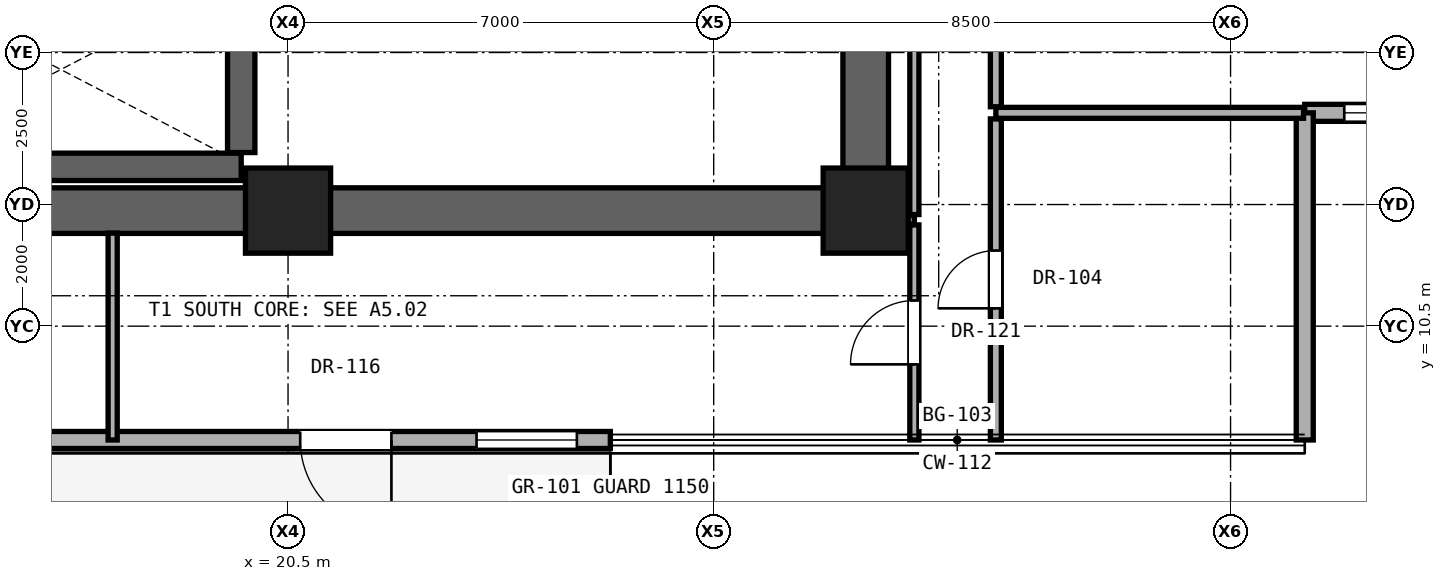
"""IFC4 building model, lengths in metres.
Left out: names, types, materials, properties, quantities, classifications, styles, units other than length and angle.
Written with IfcOpenShell. Run it as: python <this file> out.ifc"""

import sys

from ifc_helpers import new_model, si_unit, direction, frame, frame_2d, origin, origin_2d, place, context, subcontext, project, spatial, rectangle, extrude, element, fill, save


model = new_model("IFC4")
c1 = context("Model", 3, precision=1e-05, world=origin(), true_north=direction((0.0, 1.0)))
c2 = subcontext(c1, "Body", "Model", "MODEL_VIEW")
j1 = project(units=[si_unit("LENGTHUNIT", "METRE"), si_unit("PLANEANGLEUNIT", "RADIAN")], contexts=[c1])
p1 = place(None, origin())
s1 = spatial("IfcSite", under=j1, at=p1, CompositionType="ELEMENT")
p2 = place(p1, origin())
s2 = spatial("IfcBuilding", under=s1, at=p2, CompositionType="ELEMENT")
p3 = place(p2, frame((0.0, 0.0, 35.6)))
s3 = spatial("IfcBuildingStorey", under=s2, at=p3, CompositionType="ELEMENT", Elevation=35.6)
for number, where, z_axis, x_axis in (
    (1, (20.5, 12.4, 0.0), (0.0, 0.0, 1.0), (1.0, 0.0, 0.0)),
    (2, (30.0, 12.4, 0.0), (0.0, 0.0, 1.0), (1.0, 0.0, 0.0)),
):
    element("IfcColumn", number, at=place(p3, frame(where, z_axis=z_axis, x_axis=x_axis)), inside=s3, PredefinedType="COLUMN", context=c2, shape_type="SweptSolid", body=[
        extrude(rectangle(XDim=1.4, YDim=1.4, at=origin_2d()), origin(), (0.0, 0.0, 1.0), 3.3),
    ])
p4 = place(p3, frame((11.0, 12.4, 0.0), z_axis=(0.0, 0.0, 1.0), x_axis=(1.0, 0.0, 0.0)))
e3 = element("IfcWall", 3, at=p4, inside=s3, PredefinedType="SHEAR", context=c2, shape_type="SweptSolid", body=[
    extrude(rectangle(XDim=19.0, YDim=0.75, at=frame_2d((9.5, 0.0))), origin(), (0.0, 0.0, 1.0), 3.06),
])
p5 = place(p3, frame((30.0, 12.4, 0.0), z_axis=(0.0, 0.0, 1.0), x_axis=(0.0, 1.0, 0.0)))
e4 = element("IfcWall", 4, at=p5, inside=s3, PredefinedType="SHEAR", context=c2, shape_type="SweptSolid", body=[
    extrude(rectangle(XDim=6.0, YDim=0.75, at=frame_2d((3.0, 0.0))), origin(), (0.0, 0.0, 1.0), 3.06),
])
p6 = place(p3, frame((25.8, 8.628, 0.0), z_axis=(0.0, 0.0, 1.0), x_axis=(-1.0, 0.0, 0.0)))
e5 = element("IfcWall", 5, at=p6, inside=s3, PredefinedType="SOLIDWALL", context=c2, shape_type="SweptSolid", body=[
    extrude(rectangle(XDim=10.6, YDim=0.28, at=frame_2d((5.3, 0.0))), origin(), (0.0, 0.0, 1.0), 3.02),
])
p7 = place(p6, frame((0.55, 0.0, 0.67)))
e6 = element("IfcOpeningElement", 6, at=p7, cuts=e5, PredefinedType="OPENING", context=c2, shape_type="SweptSolid", body=[
    extrude(rectangle(XDim=1.65, YDim=2.2, at=frame_2d((0.825, 1.1))), frame((0.0, 0.15, 0.0), z_axis=(0.0, -1.0, 0.0), x_axis=(1.0, 0.0, 0.0)), (0.0, 0.0, 1.0), 0.3),
])
p8 = place(p6, frame((3.6, 0.0, 0.0)))
e7 = element("IfcOpeningElement", 7, at=p8, cuts=e5, PredefinedType="OPENING", context=c2, shape_type="SweptSolid", body=[
    extrude(rectangle(XDim=1.5, YDim=2.3, at=frame_2d((0.75, 1.15))), frame((0.0, 0.15, 0.0), z_axis=(0.0, -1.0, 0.0), x_axis=(1.0, 0.0, 0.0)), (0.0, 0.0, 1.0), 0.3),
])
p9 = place(p3, frame((37.22, 14.008, 0.0), z_axis=(0.0, 0.0, 1.0), x_axis=(1.0, 0.0, 0.0)))
e8 = element("IfcWall", 8, at=p9, inside=s3, PredefinedType="SOLIDWALL", context=c2, shape_type="SweptSolid", body=[
    extrude(rectangle(XDim=5.38, YDim=0.28, at=frame_2d((2.69, 0.0))), origin(), (0.0, 0.0, 1.0), 3.04),
])
p10 = place(p9, frame((0.65, 0.0, 0.85)))
e9 = element("IfcOpeningElement", 9, at=p10, cuts=e8, PredefinedType="OPENING", context=c2, shape_type="SweptSolid", body=[
    extrude(rectangle(XDim=1.1, YDim=2.0, at=frame_2d((0.55, 1.0))), frame((0.0, 0.15, 0.0), z_axis=(0.0, -1.0, 0.0), x_axis=(1.0, 0.0, 0.0)), (0.0, 0.0, 1.0), 0.3),
])
p11 = place(p3, frame((37.22, 8.628, 0.0), z_axis=(0.0, 0.0, 1.0), x_axis=(0.0, 1.0, 0.0)))
e10 = element("IfcWall", 10, at=p11, inside=s3, PredefinedType="SOLIDWALL", context=c2, shape_type="SweptSolid", body=[
    extrude(rectangle(XDim=5.38, YDim=0.28, at=frame_2d((2.69, 0.0))), origin(), (0.0, 0.0, 1.0), 3.04),
])
p12 = place(p3, frame((30.37, 12.25, 0.0), z_axis=(0.0, 0.0, 1.0), x_axis=(1.0, 0.0, 0.0)))
e11 = element("IfcWall", 11, at=p12, inside=s3, PredefinedType="PARTITIONING", context=c2, shape_type="SweptSolid", body=[
    extrude(rectangle(XDim=0.43, YDim=0.15, at=frame_2d((0.215, 0.0))), origin(), (0.0, 0.0, 1.0), 3.06),
])
p13 = place(p3, frame((11.37, 13.12, 0.0), z_axis=(0.0, 0.0, 1.0), x_axis=(1.0, 0.0, 0.0)))
e12 = element("IfcWall", 12, at=p13, inside=s3, PredefinedType="SHEAR", context=c2, shape_type="SweptSolid", body=[
    extrude(rectangle(XDim=8.36, YDim=0.45, at=frame_2d((4.18, 0.0))), origin(), (0.0, 0.0, 1.0), 3.06),
])
p14 = place(p3, frame((32.14, 14.008, 0.0), z_axis=(0.0, 0.0, 1.0), x_axis=(1.0, 0.0, 0.0)))
e13 = element("IfcWall", 13, at=p14, inside=s3, PredefinedType="PARTITIONING", context=c2, shape_type="SweptSolid", body=[
    extrude(rectangle(XDim=5.06, YDim=0.18, at=frame_2d((2.53, 0.0))), origin(), (0.0, 0.0, 1.0), 3.06),
])
p15 = place(p3, frame((17.616, 8.628, 0.0), z_axis=(0.0, 0.0, 1.0), x_axis=(0.0, 1.0, 0.0)))
e14 = element("IfcWall", 14, at=p15, inside=s3, PredefinedType="PARTITIONING", context=c2, shape_type="SweptSolid", body=[
    extrude(rectangle(XDim=3.402, YDim=0.15, at=frame_2d((1.701, 0.0))), origin(), (0.0, 0.0, 1.0), 3.06),
])
p16 = place(p3, frame((19.73, 13.355, 0.0), z_axis=(0.0, 0.0, 1.0), x_axis=(0.0, 1.0, 0.0)))
e15 = element("IfcWall", 15, at=p16, inside=s3, PredefinedType="SHEAR", context=c2, shape_type="SweptSolid", body=[
    extrude(rectangle(XDim=2.73, YDim=0.45, at=frame_2d((1.365, 0.0))), origin(), (0.0, 0.0, 1.0), 3.06),
])
p17 = place(p3, frame((30.8, 8.628, 0.0), z_axis=(0.0, 0.0, 1.0), x_axis=(0.0, 1.0, 0.0)))
e16 = element("IfcWall", 16, at=p17, inside=s3, PredefinedType="PARTITIONING", context=c2, shape_type="SweptSolid", body=[
    extrude(rectangle(XDim=3.537, YDim=0.15, at=frame_2d((1.769, 0.0))), origin(), (0.0, 0.0, 1.0), 3.06),
])
p18 = place(p17, frame((1.243, 0.0, 0.0)))
e17 = element("IfcOpeningElement", 17, at=p18, cuts=e16, PredefinedType="OPENING", context=c2, shape_type="SweptSolid", body=[
    extrude(rectangle(XDim=1.05, YDim=2.2, at=frame_2d((0.525, 1.1))), frame((0.0, 0.085, 0.0), z_axis=(0.0, -1.0, 0.0), x_axis=(1.0, 0.0, 0.0)), (0.0, 0.0, 1.0), 0.17),
])
p19 = place(p3, frame((30.8, 12.335, 0.0), z_axis=(0.0, 0.0, 1.0), x_axis=(0.0, 1.0, 0.0)))
e18 = element("IfcWall", 18, at=p19, inside=s3, PredefinedType="PARTITIONING", context=c2, shape_type="SweptSolid", body=[
    extrude(rectangle(XDim=5.98, YDim=0.15, at=frame_2d((2.99, 0.0))), origin(), (0.0, 0.0, 1.0), 2.436),
])
p20 = place(p3, frame((32.14, 8.628, 0.0), z_axis=(0.0, 0.0, 1.0), x_axis=(0.0, 1.0, 0.0)))
e19 = element("IfcWall", 19, at=p20, inside=s3, PredefinedType="PARTITIONING", context=c2, shape_type="SweptSolid", body=[
    extrude(rectangle(XDim=5.28, YDim=0.18, at=frame_2d((2.64, 0.0))), origin(), (0.0, 0.0, 1.0), 3.06),
])
p21 = place(p20, frame((2.165, 0.0, 0.0)))
e20 = element("IfcOpeningElement", 20, at=p21, cuts=e19, PredefinedType="OPENING", context=c2, shape_type="SweptSolid", body=[
    extrude(rectangle(XDim=0.95, YDim=2.15, at=frame_2d((0.475, 1.075))), frame((0.0, 0.1, 0.0), z_axis=(0.0, -1.0, 0.0), x_axis=(1.0, 0.0, 0.0)), (0.0, 0.0, 1.0), 0.2),
])
p22 = place(p3, frame((32.14, 14.108, 0.0), z_axis=(0.0, 0.0, 1.0), x_axis=(0.0, 1.0, 0.0)))
e21 = element("IfcWall", 21, at=p22, inside=s3, PredefinedType="PARTITIONING", context=c2, shape_type="SweptSolid", body=[
    extrude(rectangle(XDim=4.773, YDim=0.18, at=frame_2d((2.387, 0.0))), origin(), (0.0, 0.0, 1.0), 2.436),
])
p23 = place(p22, frame((2.812, 0.0, 0.0)))
e22 = element("IfcOpeningElement", 22, at=p23, cuts=e21, PredefinedType="OPENING", context=c2, shape_type="SweptSolid", body=[
    extrude(rectangle(XDim=1.05, YDim=2.2, at=frame_2d((0.525, 1.1))), frame((0.0, 0.1, 0.0), z_axis=(0.0, -1.0, 0.0), x_axis=(1.0, 0.0, 0.0)), (0.0, 0.0, 1.0), 0.2),
])
p24 = place(p7, origin())
e23 = element("IfcWindow", 23, at=p24, inside=s3, PartitioningType="SINGLE_PANEL", PredefinedType="WINDOW", context=c2, shape_type="SweptSolid", body=[
    extrude(rectangle(XDim=1.65, YDim=2.2, at=frame_2d((0.825, 1.1))), frame((0.0, 0.03, 0.0), z_axis=(0.0, -1.0, 0.0), x_axis=(1.0, 0.0, 0.0)), (0.0, 0.0, 1.0), 0.06),
])
fill(e6, e23)
p25 = place(p8, origin())
e24 = element("IfcDoor", 24, at=p25, inside=s3, OperationType="SINGLE_SWING_LEFT", PredefinedType="DOOR", context=c2, shape_type="SweptSolid", body=[
    extrude(rectangle(XDim=1.5, YDim=2.3, at=frame_2d((0.75, 1.15))), frame((0.0, 0.025, 0.0), z_axis=(0.0, -1.0, 0.0), x_axis=(1.0, 0.0, 0.0)), (0.0, 0.0, 1.0), 0.05),
])
fill(e7, e24)
p26 = place(p10, origin())
e25 = element("IfcWindow", 25, at=p26, inside=s3, PartitioningType="SINGLE_PANEL", PredefinedType="WINDOW", context=c2, shape_type="SweptSolid", body=[
    extrude(rectangle(XDim=1.1, YDim=2.0, at=frame_2d((0.55, 1.0))), frame((0.0, 0.03, 0.0), z_axis=(0.0, -1.0, 0.0), x_axis=(1.0, 0.0, 0.0)), (0.0, 0.0, 1.0), 0.06),
])
fill(e9, e25)
p27 = place(p18, origin())
e26 = element("IfcDoor", 26, at=p27, inside=s3, OperationType="SINGLE_SWING_LEFT", PredefinedType="DOOR", context=c2, shape_type="SweptSolid", body=[
    extrude(rectangle(XDim=1.05, YDim=2.2, at=frame_2d((0.525, 1.1))), frame((0.0, 0.025, 0.0), z_axis=(0.0, -1.0, 0.0), x_axis=(1.0, 0.0, 0.0)), (0.0, 0.0, 1.0), 0.05),
])
fill(e17, e26)
p28 = place(p21, origin())
e27 = element("IfcDoor", 27, at=p28, inside=s3, OperationType="SINGLE_SWING_LEFT", PredefinedType="DOOR", context=c2, shape_type="SweptSolid", body=[
    extrude(rectangle(XDim=0.95, YDim=2.15, at=frame_2d((0.475, 1.075))), frame((0.0, 0.025, 0.0), z_axis=(0.0, -1.0, 0.0), x_axis=(1.0, 0.0, 0.0)), (0.0, 0.0, 1.0), 0.05),
])
fill(e20, e27)
save(model, sys.argv[1])
